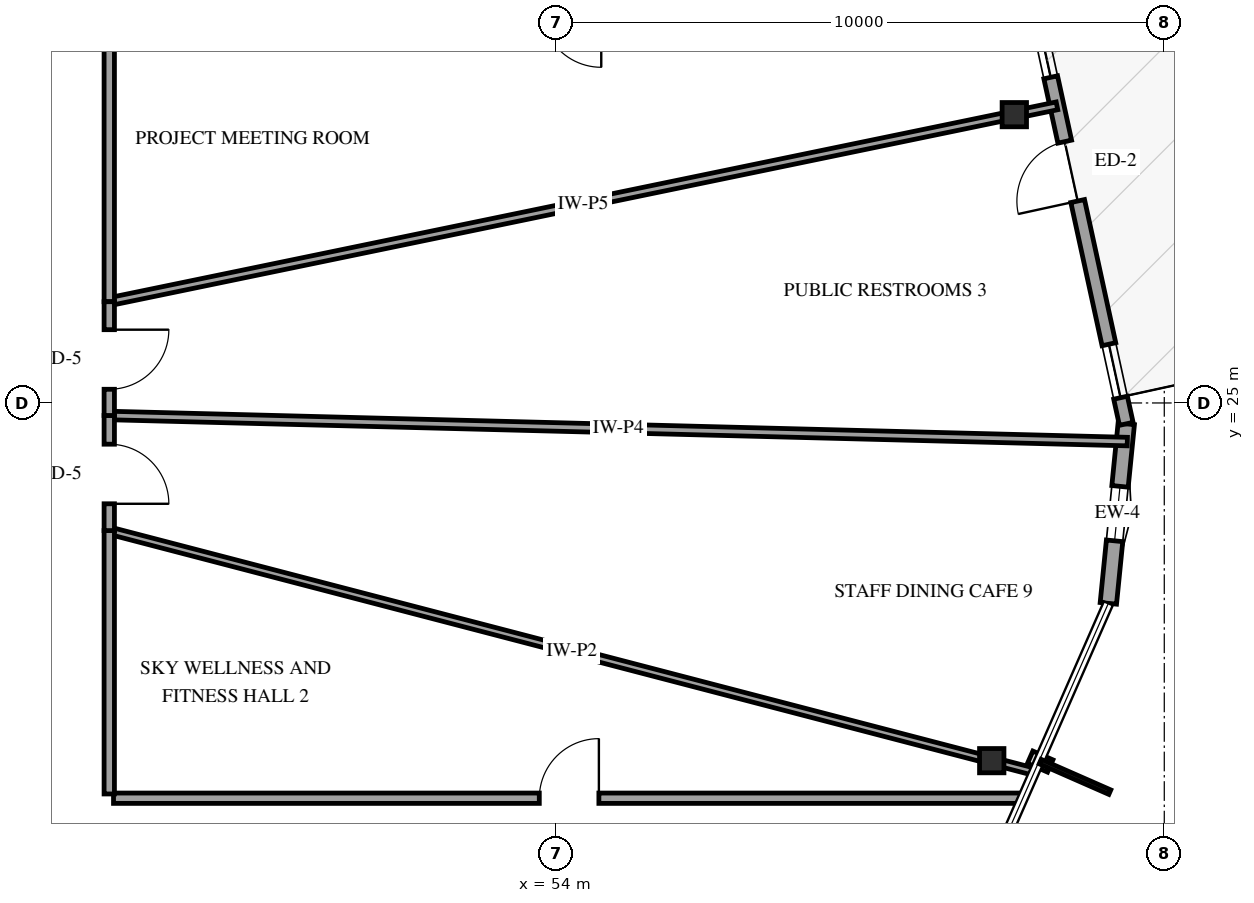
"""IFC4 building model, lengths in metres.
Left out: names, types, materials, properties, quantities, classifications, styles, units other than length and angle.
Written with IfcOpenShell. Run it as: python <this file> out.ifc"""

import sys

from ifc_helpers import new_model, si_unit, direction, frame, frame_2d, origin, origin_2d, place, context, subcontext, project, spatial, rectangle, i_section, extrude, element, fill, save


model = new_model("IFC4")
c1 = context("Model", 3, precision=1e-05, world=origin(), true_north=direction((0.0, 1.0)))
c2 = subcontext(c1, "Body", "Model", "MODEL_VIEW")
j1 = project(units=[si_unit("LENGTHUNIT", "METRE"), si_unit("PLANEANGLEUNIT", "RADIAN")], contexts=[c1])
p1 = place(None, origin())
s1 = spatial("IfcSite", under=j1, at=p1, CompositionType="ELEMENT")
p2 = place(p1, origin())
s2 = spatial("IfcBuilding", under=s1, at=p2, CompositionType="ELEMENT")
p3 = place(p2, frame((0.0, 0.0, 276.25)))
s3 = spatial("IfcBuildingStorey", under=s2, at=p3, CompositionType="ELEMENT", Elevation=276.25)
for number, where, z_axis, x_axis in (
    (1, (61.534, 29.741, 0.0), (0.0, 0.0, 1.0), (1.0, 0.0, 0.0)),
    (2, (61.163, 19.117, 0.0), (0.0, 0.0, 1.0), (1.0, 0.0, 0.0)),
):
    element("IfcColumn", number, at=place(p3, frame(where, z_axis=z_axis, x_axis=x_axis)), inside=s3, PredefinedType="COLUMN", context=c2, shape_type="SweptSolid", body=[
        extrude(i_section(OverallWidth=0.401, OverallDepth=0.399, WebThickness=0.025, FlangeThickness=0.04, FilletRadius=0.038, at=origin_2d()), origin(), (0.0, 0.0, 1.0), 3.75),
    ])
p4 = place(p3, frame((63.08, 21.705, 0.0), z_axis=(0.0, 0.0, 1.0), x_axis=(0.099332604759, 0.995054286776, 0.0)))
e3 = element("IfcWall", 3, at=p4, inside=s3, PredefinedType="SOLIDWALL", context=c2, shape_type="SweptSolid", body=[
    extrude(rectangle(XDim=2.967, YDim=0.27, at=frame_2d((1.483, 0.0))), origin(), (0.0, 0.0, 1.0), 2.829),
])
p5 = place(p4, frame((1.033, 0.0, 0.75)))
e4 = element("IfcOpeningElement", 4, at=p5, cuts=e3, PredefinedType="OPENING", context=c2, shape_type="SweptSolid", body=[
    extrude(rectangle(XDim=0.9, YDim=1.5, at=frame_2d((0.45, 0.75))), frame((0.0, 0.145, 0.0), z_axis=(0.0, -1.0, 0.0), x_axis=(1.0, 0.0, 0.0)), (0.0, 0.0, 1.0), 0.29),
])
p6 = place(p3, frame((63.375, 24.656, 0.0), z_axis=(0.0, 0.0, 1.0), x_axis=(-0.213011537402, 0.977049683964, 0.0)))
e5 = element("IfcWall", 5, at=p6, inside=s3, PredefinedType="SOLIDWALL", context=c2, shape_type="SweptSolid", body=[
    extrude(rectangle(XDim=8.5, YDim=0.23, at=frame_2d((4.25, 0.0))), origin(), (0.0, 0.0, 1.0), 2.829),
])
p7 = place(p6, frame((3.75, 0.0, 0.0)))
e6 = element("IfcOpeningElement", 6, at=p7, cuts=e5, PredefinedType="OPENING", context=c2, shape_type="SweptSolid", body=[
    extrude(rectangle(XDim=1.0, YDim=2.15, at=frame_2d((0.5, 1.075))), frame((0.0, 0.125, 0.0), z_axis=(0.0, -1.0, 0.0), x_axis=(1.0, 0.0, 0.0)), (0.0, 0.0, 1.0), 0.25),
])
p8 = place(p6, frame((0.44, 0.0, 0.72)))
e7 = element("IfcOpeningElement", 7, at=p8, cuts=e5, PredefinedType="OPENING", context=c2, shape_type="SweptSolid", body=[
    extrude(rectangle(XDim=0.9, YDim=1.5, at=frame_2d((0.45, 0.75))), frame((0.0, 0.125, 0.0), z_axis=(0.0, -1.0, 0.0), x_axis=(1.0, 0.0, 0.0)), (0.0, 0.0, 1.0), 0.25),
])
p9 = place(p6, frame((5.833, 0.0, 0.72)))
e8 = element("IfcOpeningElement", 8, at=p9, cuts=e5, PredefinedType="OPENING", context=c2, shape_type="SweptSolid", body=[
    extrude(rectangle(XDim=0.9, YDim=1.5, at=frame_2d((0.45, 0.75))), frame((0.0, 0.125, 0.0), z_axis=(0.0, -1.0, 0.0), x_axis=(1.0, 0.0, 0.0)), (0.0, 0.0, 1.0), 0.25),
])
p10 = place(p3, frame((63.392, 24.365, 0.0), z_axis=(0.0, 0.0, 1.0), x_axis=(-0.999671938343, 0.02561280325, 0.0)))
e9 = element("IfcWall", 9, at=p10, inside=s3, PredefinedType="PARTITIONING", context=c2, shape_type="SweptSolid", body=[
    extrude(rectangle(XDim=16.748, YDim=0.14, at=frame_2d((8.374, 0.0))), origin(), (0.0, 0.0, 1.0), 3.45),
])
p11 = place(p3, frame((46.65, 26.665, 0.0), z_axis=(0.0, 0.0, 1.0), x_axis=(0.979305001036, 0.202390007028, 0.0)))
e10 = element("IfcWall", 10, at=p11, inside=s3, PredefinedType="PARTITIONING", context=c2, shape_type="SweptSolid", body=[
    extrude(rectangle(XDim=15.915, YDim=0.13, at=frame_2d((7.957, 0.0))), origin(), (0.0, 0.0, 1.0), 2.745),
])
p12 = place(p3, frame((46.65, 22.901, 0.0), z_axis=(0.0, 0.0, 1.0), x_axis=(0.967649914042, -0.252296737702, 0.0)))
e11 = element("IfcWall", 11, at=p12, inside=s3, PredefinedType="PARTITIONING", context=c2, shape_type="SweptSolid", body=[
    extrude(rectangle(XDim=15.723, YDim=0.12, at=frame_2d((7.861, 0.0))), origin(), (0.0, 0.0, 1.0), 3.45),
])
p13 = place(p3, frame((46.72, 18.5, 0.0), z_axis=(0.0, 0.0, 1.0), x_axis=(1.0, 0.0, 0.0)))
e12 = element("IfcWall", 12, at=p13, inside=s3, PredefinedType="PARTITIONING", context=c2, shape_type="SweptSolid", body=[
    extrude(rectangle(XDim=14.953, YDim=0.17, at=frame_2d((7.477, 0.0))), origin(), (0.0, 0.0, 1.0), 2.745),
])
p14 = place(p13, frame((7.002, 0.0, 0.0)))
e13 = element("IfcOpeningElement", 13, at=p14, cuts=e12, PredefinedType="OPENING", context=c2, shape_type="SweptSolid", body=[
    extrude(rectangle(XDim=0.98, YDim=2.15, at=frame_2d((0.49, 1.075))), frame((0.0, 0.095, 0.0), z_axis=(0.0, -1.0, 0.0), x_axis=(1.0, 0.0, 0.0)), (0.0, 0.0, 1.0), 0.19),
])
p15 = place(p3, frame((46.65, 31.5, 0.0), z_axis=(0.0, 0.0, 1.0), x_axis=(0.0, -1.0, 0.0)))
e14 = element("IfcWall", 14, at=p15, inside=s3, PredefinedType="PARTITIONING", context=c2, shape_type="SweptSolid", body=[
    extrude(rectangle(XDim=4.835, YDim=0.17, at=frame_2d((2.417, 0.0))), origin(), (0.0, 0.0, 1.0), 3.45),
])
p16 = place(p3, frame((46.65, 22.901, 0.0), z_axis=(0.0, 0.0, 1.0), x_axis=(0.0, -1.0, 0.0)))
e15 = element("IfcWall", 15, at=p16, inside=s3, PredefinedType="PARTITIONING", context=c2, shape_type="SweptSolid", body=[
    extrude(rectangle(XDim=4.331, YDim=0.17, at=frame_2d((2.166, 0.0))), origin(), (0.0, 0.0, 1.0), 3.45),
])
p17 = place(p3, frame((46.65, 24.794, 0.0), z_axis=(0.0, 0.0, 1.0), x_axis=(0.0, -1.0, 0.0)))
e16 = element("IfcWall", 16, at=p17, inside=s3, PredefinedType="PARTITIONING", context=c2, shape_type="SweptSolid", body=[
    extrude(rectangle(XDim=1.893, YDim=0.17, at=frame_2d((0.947, 0.0))), origin(), (0.0, 0.0, 1.0), 3.45),
])
p18 = place(p17, frame((0.472, 0.0, 0.0)))
e17 = element("IfcOpeningElement", 17, at=p18, cuts=e16, PredefinedType="OPENING", context=c2, shape_type="SweptSolid", body=[
    extrude(rectangle(XDim=0.98, YDim=2.15, at=frame_2d((0.49, 1.075))), frame((0.0, 0.095, 0.0), z_axis=(0.0, -1.0, 0.0), x_axis=(1.0, 0.0, 0.0)), (0.0, 0.0, 1.0), 0.19),
])
p19 = place(p3, frame((46.65, 26.665, 0.0), z_axis=(0.0, 0.0, 1.0), x_axis=(0.0, -1.0, 0.0)))
e18 = element("IfcWall", 18, at=p19, inside=s3, PredefinedType="PARTITIONING", context=c2, shape_type="SweptSolid", body=[
    extrude(rectangle(XDim=1.871, YDim=0.17, at=frame_2d((0.936, 0.0))), origin(), (0.0, 0.0, 1.0), 3.45),
])
p20 = place(p19, frame((0.46, 0.0, 0.0)))
e19 = element("IfcOpeningElement", 19, at=p20, cuts=e18, PredefinedType="OPENING", context=c2, shape_type="SweptSolid", body=[
    extrude(rectangle(XDim=0.98, YDim=2.15, at=frame_2d((0.49, 1.075))), frame((0.0, 0.095, 0.0), z_axis=(0.0, -1.0, 0.0), x_axis=(1.0, 0.0, 0.0)), (0.0, 0.0, 1.0), 0.19),
])
p21 = place(p5, origin())
e20 = element("IfcWindow", 20, at=p21, inside=s3, PartitioningType="SINGLE_PANEL", PredefinedType="WINDOW", context=c2, shape_type="SweptSolid", body=[
    extrude(rectangle(XDim=0.9, YDim=1.5, at=frame_2d((0.45, 0.75))), frame((0.0, 0.03, 0.0), z_axis=(0.0, -1.0, 0.0), x_axis=(1.0, 0.0, 0.0)), (0.0, 0.0, 1.0), 0.06),
])
fill(e4, e20)
p22 = place(p7, origin())
e21 = element("IfcDoor", 21, at=p22, inside=s3, OperationType="SINGLE_SWING_LEFT", PredefinedType="DOOR", context=c2, shape_type="SweptSolid", body=[
    extrude(rectangle(XDim=1.0, YDim=2.15, at=frame_2d((0.5, 1.075))), frame((0.0, 0.025, 0.0), z_axis=(0.0, -1.0, 0.0), x_axis=(1.0, 0.0, 0.0)), (0.0, 0.0, 1.0), 0.05),
])
fill(e6, e21)
p23 = place(p8, origin())
e22 = element("IfcWindow", 22, at=p23, inside=s3, PartitioningType="SINGLE_PANEL", PredefinedType="WINDOW", context=c2, shape_type="SweptSolid", body=[
    extrude(rectangle(XDim=0.9, YDim=1.5, at=frame_2d((0.45, 0.75))), frame((0.0, 0.03, 0.0), z_axis=(0.0, -1.0, 0.0), x_axis=(1.0, 0.0, 0.0)), (0.0, 0.0, 1.0), 0.06),
])
fill(e7, e22)
p24 = place(p9, origin())
e23 = element("IfcWindow", 23, at=p24, inside=s3, PartitioningType="SINGLE_PANEL", PredefinedType="WINDOW", context=c2, shape_type="SweptSolid", body=[
    extrude(rectangle(XDim=0.9, YDim=1.5, at=frame_2d((0.45, 0.75))), frame((0.0, 0.03, 0.0), z_axis=(0.0, -1.0, 0.0), x_axis=(1.0, 0.0, 0.0)), (0.0, 0.0, 1.0), 0.06),
])
fill(e8, e23)
p25 = place(p14, origin())
e24 = element("IfcDoor", 24, at=p25, inside=s3, OperationType="SINGLE_SWING_RIGHT", PredefinedType="DOOR", context=c2, shape_type="SweptSolid", body=[
    extrude(rectangle(XDim=0.98, YDim=2.15, at=frame_2d((0.49, 1.075))), frame((0.0, 0.025, 0.0), z_axis=(0.0, -1.0, 0.0), x_axis=(1.0, 0.0, 0.0)), (0.0, 0.0, 1.0), 0.05),
])
fill(e13, e24)
p26 = place(p18, origin())
e25 = element("IfcDoor", 25, at=p26, inside=s3, OperationType="SINGLE_SWING_RIGHT", PredefinedType="DOOR", context=c2, shape_type="SweptSolid", body=[
    extrude(rectangle(XDim=0.98, YDim=2.15, at=frame_2d((0.49, 1.075))), frame((0.0, 0.025, 0.0), z_axis=(0.0, -1.0, 0.0), x_axis=(1.0, 0.0, 0.0)), (0.0, 0.0, 1.0), 0.05),
])
fill(e17, e25)
p27 = place(p20, origin())
e26 = element("IfcDoor", 26, at=p27, inside=s3, OperationType="SINGLE_SWING_LEFT", PredefinedType="DOOR", context=c2, shape_type="SweptSolid", body=[
    extrude(rectangle(XDim=0.98, YDim=2.15, at=frame_2d((0.49, 1.075))), frame((0.0, 0.025, 0.0), z_axis=(0.0, -1.0, 0.0), x_axis=(1.0, 0.0, 0.0)), (0.0, 0.0, 1.0), 0.05),
])
fill(e19, e26)
save(model, sys.argv[1])
